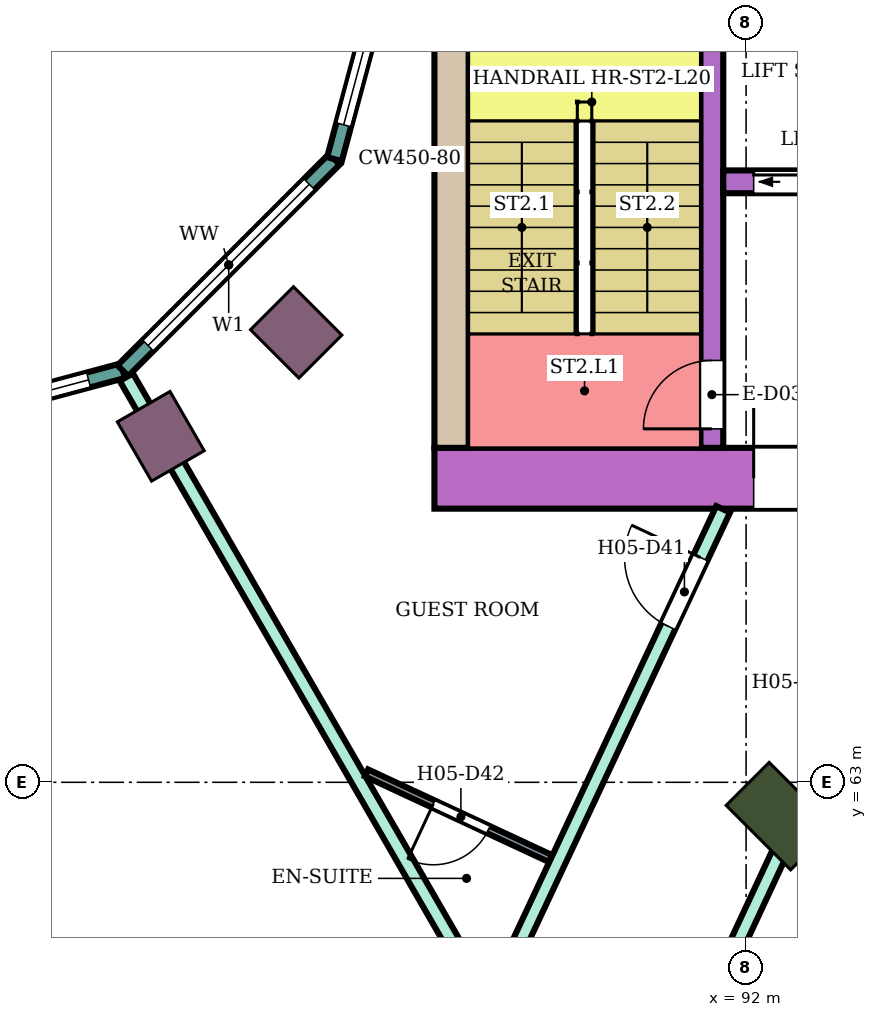
"""IFC4 building model, lengths in metres.
Left out: names, types, materials, properties, quantities, classifications, styles, units other than length and angle.
Written with IfcOpenShell. Run it as: python <this file> out.ifc"""

import sys

from ifc_helpers import new_model, si_unit, direction, frame, frame_2d, origin, origin_2d, place, context, subcontext, project, spatial, rectangle, extrude, element, fill, save


model = new_model("IFC4")
c1 = context("Model", 3, precision=1e-05, world=origin(), true_north=direction((0.0, 1.0)))
c2 = subcontext(c1, "Body", "Model", "MODEL_VIEW")
j1 = project(units=[si_unit("LENGTHUNIT", "METRE"), si_unit("PLANEANGLEUNIT", "RADIAN")], contexts=[c1])
p1 = place(None, origin())
s1 = spatial("IfcSite", under=j1, at=p1, CompositionType="ELEMENT")
p2 = place(p1, origin())
s2 = spatial("IfcBuilding", under=s1, at=p2, CompositionType="ELEMENT")
p3 = place(p2, frame((0.0, 0.0, 90.0)))
s3 = spatial("IfcBuildingStorey", under=s2, at=p3, CompositionType="ELEMENT", Elevation=90.0)
p4 = place(p3, frame((92.445, 62.555, 0.0), z_axis=(0.0, 0.0, 1.0), x_axis=(0.707106781187, -0.707106781187, 0.0)))
e1 = element("IfcColumn", 1, at=p4, inside=s3, PredefinedType="COLUMN", context=c2, shape_type="SweptSolid", body=[
    extrude(rectangle(XDim=1.2, YDim=0.8, at=origin_2d()), origin(), (0.0, 0.0, 1.0), 3.8),
])
for number, where, z_axis, x_axis in (
    (2, (84.3, 67.552, 0.0), (0.0, 0.0, 1.0), (0.5, -0.866, 0.0)),
    (3, (86.081, 68.919, 0.0), (0.0, 0.0, 1.0), (0.707, -0.707, 0.0)),
):
    element("IfcColumn", number, at=place(p3, frame(where, z_axis=z_axis, x_axis=x_axis)), inside=s3, PredefinedType="COLUMN", context=c2, shape_type="SweptSolid", body=[
        extrude(rectangle(XDim=0.9, YDim=0.8, at=origin_2d()), origin(), (0.0, 0.0, 1.0), 3.8),
    ])
p5 = place(p3, frame((87.9, 67.0, 0.0), z_axis=(0.0, 0.0, 1.0), x_axis=(1.0, 0.0, 0.0)))
e4 = element("IfcWall", 4, at=p5, inside=s3, PredefinedType="SHEAR", context=c2, shape_type="SweptSolid", body=[
    extrude(rectangle(XDim=14.7, YDim=0.8, at=frame_2d((7.35, 0.0))), origin(), (0.0, 0.0, 1.0), 3.48),
])
p6 = place(p5, frame((4.2, 0.0, 0.0)))
e5 = element("IfcOpeningElement", 5, at=p6, cuts=e4, PredefinedType="OPENING", context=c2, shape_type="SweptSolid", body=[
    extrude(rectangle(XDim=2.4, YDim=2.4, at=frame_2d((1.2, 1.2))), frame((0.0, 0.41, 0.0), z_axis=(0.0, -1.0, 0.0), x_axis=(1.0, 0.0, 0.0)), (0.0, 0.0, 1.0), 0.82),
])
p7 = place(p3, frame((88.125, 67.4, 0.0), z_axis=(0.0, 0.0, 1.0), x_axis=(0.0, 1.0, 0.0)))
e6 = element("IfcWall", 6, at=p7, inside=s3, PredefinedType="SHEAR", context=c2, shape_type="SweptSolid", body=[
    extrude(rectangle(XDim=7.6, YDim=0.45, at=frame_2d((3.8, 0.0))), origin(), (0.0, 0.0, 1.0), 3.48),
])
p8 = place(p3, frame((91.55, 67.4, 0.0), z_axis=(0.0, 0.0, 1.0), x_axis=(0.0, 1.0, 0.0)))
e7 = element("IfcWall", 7, at=p8, inside=s3, PredefinedType="SHEAR", context=c2, shape_type="SweptSolid", body=[
    extrude(rectangle(XDim=7.6, YDim=0.3, at=frame_2d((3.8, 0.0))), origin(), (0.0, 0.0, 1.0), 3.48),
])
p9 = place(p8, frame((0.25, 0.0, 0.0)))
e8 = element("IfcOpeningElement", 8, at=p9, cuts=e7, PredefinedType="OPENING", context=c2, shape_type="SweptSolid", body=[
    extrude(rectangle(XDim=0.9, YDim=2.1, at=frame_2d((0.45, 1.05))), frame((0.0, 0.16, 0.0), z_axis=(0.0, -1.0, 0.0), x_axis=(1.0, 0.0, 0.0)), (0.0, 0.0, 1.0), 0.32),
])
p10 = place(p3, frame((91.7, 70.9, 0.0), z_axis=(0.0, 0.0, 1.0), x_axis=(1.0, 0.0, 0.0)))
e9 = element("IfcWall", 9, at=p10, inside=s3, PredefinedType="SHEAR", context=c2, shape_type="SweptSolid", body=[
    extrude(rectangle(XDim=10.9, YDim=0.3, at=frame_2d((5.45, 0.0))), origin(), (0.0, 0.0, 1.0), 3.48),
])
p11 = place(p10, frame((0.4, 0.0, 0.0)))
e10 = element("IfcOpeningElement", 10, at=p11, cuts=e9, PredefinedType="OPENING", context=c2, shape_type="SweptSolid", body=[
    extrude(rectangle(XDim=1.4, YDim=2.1, at=frame_2d((0.7, 1.05))), frame((0.0, 0.16, 0.0), z_axis=(0.0, -1.0, 0.0), x_axis=(1.0, 0.0, 0.0)), (0.0, 0.0, 1.0), 0.32),
])
p12 = place(p10, frame((5.4, 0.0, 0.0)))
e11 = element("IfcOpeningElement", 11, at=p12, cuts=e9, PredefinedType="OPENING", context=c2, shape_type="SweptSolid", body=[
    extrude(rectangle(XDim=1.4, YDim=2.1, at=frame_2d((0.7, 1.05))), frame((0.0, 0.16, 0.0), z_axis=(0.0, -1.0, 0.0), x_axis=(1.0, 0.0, 0.0)), (0.0, 0.0, 1.0), 0.32),
])
p13 = place(p10, frame((8.1, 0.0, 0.0)))
e12 = element("IfcOpeningElement", 12, at=p13, cuts=e9, PredefinedType="OPENING", context=c2, shape_type="SweptSolid", body=[
    extrude(rectangle(XDim=1.0, YDim=2.1, at=frame_2d((0.5, 1.05))), frame((0.0, 0.16, 0.0), z_axis=(0.0, -1.0, 0.0), x_axis=(1.0, 0.0, 0.0)), (0.0, 0.0, 1.0), 0.32),
])
p14 = place(p3, frame((80.0, 67.396, 0.0), z_axis=(0.0, 0.0, 1.0), x_axis=(0.965933654434, 0.258789828301, 0.0)))
e13 = element("IfcWall", 13, at=p14, inside=s3, PredefinedType="NOTDEFINED", context=c2, shape_type="SweptSolid", body=[
    extrude(rectangle(XDim=3.936, YDim=0.2, at=frame_2d((1.968, 0.0))), origin(), (0.0, 0.0, 1.0), 3.8),
])
p15 = place(p14, frame((0.468, 0.0, 0.9)))
e14 = element("IfcOpeningElement", 14, at=p15, cuts=e13, PredefinedType="OPENING", context=c2, shape_type="SweptSolid", body=[
    extrude(rectangle(XDim=3.0, YDim=2.3, at=frame_2d((1.5, 1.15))), frame((0.0, 0.11, 0.0), z_axis=(0.0, -1.0, 0.0), x_axis=(1.0, 0.0, 0.0)), (0.0, 0.0, 1.0), 0.22),
])
p16 = place(p3, frame((83.802, 68.415, 0.0), z_axis=(0.0, 0.0, 1.0), x_axis=(0.707106781187, 0.707106781187, 0.0)))
e15 = element("IfcWall", 15, at=p16, inside=s3, PredefinedType="NOTDEFINED", context=c2, shape_type="SweptSolid", body=[
    extrude(rectangle(XDim=3.936, YDim=0.2, at=frame_2d((1.968, 0.0))), origin(), (0.0, 0.0, 1.0), 3.8),
])
p17 = place(p16, frame((0.468, 0.0, 0.9)))
e16 = element("IfcOpeningElement", 16, at=p17, cuts=e15, PredefinedType="OPENING", context=c2, shape_type="SweptSolid", body=[
    extrude(rectangle(XDim=3.0, YDim=2.3, at=frame_2d((1.5, 1.15))), frame((0.0, 0.11, 0.0), z_axis=(0.0, -1.0, 0.0), x_axis=(1.0, 0.0, 0.0)), (0.0, 0.0, 1.0), 0.22),
])
p18 = place(p3, frame((86.585, 71.198, 0.0), z_axis=(0.0, 0.0, 1.0), x_axis=(0.258789828301, 0.965933654434, 0.0)))
e17 = element("IfcWall", 17, at=p18, inside=s3, PredefinedType="NOTDEFINED", context=c2, shape_type="SweptSolid", body=[
    extrude(rectangle(XDim=3.936, YDim=0.2, at=frame_2d((1.968, 0.0))), origin(), (0.0, 0.0, 1.0), 3.8),
])
p19 = place(p18, frame((0.468, 0.0, 0.9)))
e18 = element("IfcOpeningElement", 18, at=p19, cuts=e17, PredefinedType="OPENING", context=c2, shape_type="SweptSolid", body=[
    extrude(rectangle(XDim=3.0, YDim=2.3, at=frame_2d((1.5, 1.15))), frame((0.0, 0.11, 0.0), z_axis=(0.0, -1.0, 0.0), x_axis=(1.0, 0.0, 0.0)), (0.0, 0.0, 1.0), 0.22),
])
p20 = place(p3, frame((83.846, 68.33, 0.0), z_axis=(0.0, 0.0, 1.0), x_axis=(0.499822319857, -0.866127963163, 0.0)))
e19 = element("IfcWall", 19, at=p20, inside=s3, PredefinedType="PARTITIONING", context=c2, shape_type="SweptSolid", body=[
    extrude(rectangle(XDim=9.382, YDim=0.2, at=frame_2d((4.691, 0.0))), origin(), (0.0, 0.0, 1.0), 3.35),
])
p21 = place(p3, frame((88.501, 59.775, 0.0), z_axis=(0.0, 0.0, 1.0), x_axis=(0.424700525505, 0.905333896215, 0.0)))
e20 = element("IfcWall", 20, at=p21, inside=s3, PredefinedType="PARTITIONING", context=c2, shape_type="SweptSolid", body=[
    extrude(rectangle(XDim=7.53, YDim=0.2, at=frame_2d((3.765, 0.0))), origin(), (0.0, 0.0, 1.0), 3.35),
])
p22 = place(p21, frame((5.83, 0.0, 0.0)))
e21 = element("IfcOpeningElement", 21, at=p22, cuts=e20, PredefinedType="OPENING", context=c2, shape_type="SweptSolid", body=[
    extrude(rectangle(XDim=1.0, YDim=2.1, at=frame_2d((0.5, 1.05))), frame((0.0, 0.11, 0.0), z_axis=(0.0, -1.0, 0.0), x_axis=(1.0, 0.0, 0.0)), (0.0, 0.0, 1.0), 0.22),
])
p23 = place(p3, frame((90.346, 57.578, 0.0), z_axis=(0.0, 0.0, 1.0), x_axis=(0.422403412327, 0.906407941964, 0.0)))
e22 = element("IfcWall", 22, at=p23, inside=s3, PredefinedType="PARTITIONING", context=c2, shape_type="SweptSolid", body=[
    extrude(rectangle(XDim=8.208, YDim=0.2, at=frame_2d((4.104, 0.0))), origin(), (0.0, 0.0, 1.0), 3.35),
])
p24 = place(p23, frame((6.351, 0.0, 0.0)))
e23 = element("IfcOpeningElement", 23, at=p24, cuts=e22, PredefinedType="OPENING", context=c2, shape_type="SweptSolid", body=[
    extrude(rectangle(XDim=0.9, YDim=2.1, at=frame_2d((0.45, 1.05))), frame((0.0, 0.11, 0.0), z_axis=(0.0, -1.0, 0.0), x_axis=(1.0, 0.0, 0.0)), (0.0, 0.0, 1.0), 0.22),
])
p25 = place(p23, frame((0.55, 0.0, 0.0)))
e24 = element("IfcOpeningElement", 24, at=p25, cuts=e22, PredefinedType="OPENING", context=c2, shape_type="SweptSolid", body=[
    extrude(rectangle(XDim=1.0, YDim=2.1, at=frame_2d((0.5, 1.05))), frame((0.0, 0.11, 0.0), z_axis=(0.0, -1.0, 0.0), x_axis=(1.0, 0.0, 0.0)), (0.0, 0.0, 1.0), 0.22),
])
p26 = place(p3, frame((92.692, 62.303, 0.0), z_axis=(0.0, 0.0, 1.0), x_axis=(0.706920663731, -0.707292849667, 0.0)))
e25 = element("IfcWall", 25, at=p26, inside=s3, PredefinedType="PARTITIONING", context=c2, shape_type="SweptSolid", body=[
    extrude(rectangle(XDim=5.248, YDim=0.2, at=frame_2d((2.624, 0.0))), origin(), (0.0, 0.0, 1.0), 3.35),
])
p27 = place(p3, frame((87.006, 63.124, 0.0), z_axis=(0.0, 0.0, 1.0), x_axis=(0.906535604863, -0.422129360642, 0.0)))
e26 = element("IfcWall", 26, at=p27, inside=s3, PredefinedType="PARTITIONING", context=c2, shape_type="SweptSolid", body=[
    extrude(rectangle(XDim=2.67, YDim=0.1, at=frame_2d((1.335, 0.0))), origin(), (0.0, 0.0, 1.0), 3.35),
])
p28 = place(p27, frame((0.97, 0.0, 0.0)))
e27 = element("IfcOpeningElement", 27, at=p28, cuts=e26, PredefinedType="OPENING", context=c2, shape_type="SweptSolid", body=[
    extrude(rectangle(XDim=0.8, YDim=2.1, at=frame_2d((0.4, 1.05))), frame((0.0, 0.06, 0.0), z_axis=(0.0, -1.0, 0.0), x_axis=(1.0, 0.0, 0.0)), (0.0, 0.0, 1.0), 0.12),
])
p29 = place(p15, origin())
e28 = element("IfcWindow", 28, at=p29, inside=s3, PartitioningType="SINGLE_PANEL", PredefinedType="WINDOW", context=c2, shape_type="SweptSolid", body=[
    extrude(rectangle(XDim=3.0, YDim=2.3, at=frame_2d((1.5, 1.15))), frame((0.0, 0.03, 0.0), z_axis=(0.0, -1.0, 0.0), x_axis=(1.0, 0.0, 0.0)), (0.0, 0.0, 1.0), 0.06),
])
fill(e14, e28)
p30 = place(p17, origin())
e29 = element("IfcWindow", 29, at=p30, inside=s3, PartitioningType="SINGLE_PANEL", PredefinedType="WINDOW", context=c2, shape_type="SweptSolid", body=[
    extrude(rectangle(XDim=3.0, YDim=2.3, at=frame_2d((1.5, 1.15))), frame((0.0, 0.03, 0.0), z_axis=(0.0, -1.0, 0.0), x_axis=(1.0, 0.0, 0.0)), (0.0, 0.0, 1.0), 0.06),
])
fill(e16, e29)
p31 = place(p19, origin())
e30 = element("IfcWindow", 30, at=p31, inside=s3, PartitioningType="SINGLE_PANEL", PredefinedType="WINDOW", context=c2, shape_type="SweptSolid", body=[
    extrude(rectangle(XDim=3.0, YDim=2.3, at=frame_2d((1.5, 1.15))), frame((0.0, 0.03, 0.0), z_axis=(0.0, -1.0, 0.0), x_axis=(1.0, 0.0, 0.0)), (0.0, 0.0, 1.0), 0.06),
])
fill(e18, e30)
p32 = place(p22, origin())
e31 = element("IfcDoor", 31, at=p32, inside=s3, OperationType="SINGLE_SWING_RIGHT", PredefinedType="DOOR", context=c2, shape_type="SweptSolid", body=[
    extrude(rectangle(XDim=1.0, YDim=2.1, at=frame_2d((0.5, 1.05))), frame((0.0, 0.025, 0.0), z_axis=(0.0, -1.0, 0.0), x_axis=(1.0, 0.0, 0.0)), (0.0, 0.0, 1.0), 0.05),
])
fill(e21, e31)
p33 = place(p28, frame((0.8, 0.0, 0.0), z_axis=(0.0, 0.0, 1.0), x_axis=(-1.0, 0.0, 0.0)))
e32 = element("IfcDoor", 32, at=p33, inside=s3, OperationType="SINGLE_SWING_RIGHT", PredefinedType="DOOR", context=c2, shape_type="SweptSolid", body=[
    extrude(rectangle(XDim=0.8, YDim=2.1, at=frame_2d((0.4, 1.05))), frame((0.0, 0.025, 0.0), z_axis=(0.0, -1.0, 0.0), x_axis=(1.0, 0.0, 0.0)), (0.0, 0.0, 1.0), 0.05),
])
fill(e27, e32)
p34 = place(p9, origin())
e33 = element("IfcDoor", 33, at=p34, inside=s3, OperationType="SINGLE_SWING_LEFT", PredefinedType="DOOR", context=c2, shape_type="SweptSolid", body=[
    extrude(rectangle(XDim=0.9, YDim=2.1, at=frame_2d((0.45, 1.05))), frame((0.0, 0.025, 0.0), z_axis=(0.0, -1.0, 0.0), x_axis=(1.0, 0.0, 0.0)), (0.0, 0.0, 1.0), 0.05),
])
fill(e8, e33)
p35 = place(p11, origin())
e34 = element("IfcDoor", 34, at=p35, inside=s3, OperationType="DOUBLE_DOOR_SLIDING", PredefinedType="DOOR", context=c2, shape_type="SweptSolid", body=[
    extrude(rectangle(XDim=1.4, YDim=2.1, at=frame_2d((0.7, 1.05))), frame((0.0, 0.025, 0.0), z_axis=(0.0, -1.0, 0.0), x_axis=(1.0, 0.0, 0.0)), (0.0, 0.0, 1.0), 0.05),
])
fill(e10, e34)
p36 = place(p6, origin())
e35 = element("IfcDoor", 35, at=p36, inside=s3, OperationType="DOUBLE_DOOR_SINGLE_SWING", PredefinedType="DOOR", context=c2, shape_type="SweptSolid", body=[
    extrude(rectangle(XDim=2.4, YDim=2.4, at=frame_2d((1.2, 1.2))), frame((0.0, 0.025, 0.0), z_axis=(0.0, -1.0, 0.0), x_axis=(1.0, 0.0, 0.0)), (0.0, 0.0, 1.0), 0.05),
])
fill(e5, e35)
save(model, sys.argv[1])
